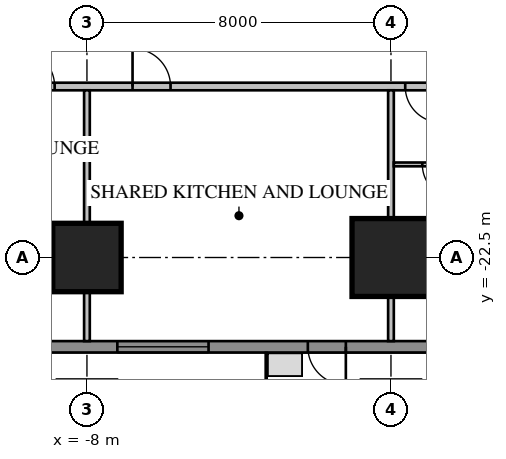
"""IFC4 building model, lengths in metres.
Left out: names, types, materials, properties, quantities, classifications, styles, units other than length and angle.
Written with IfcOpenShell. Run it as: python <this file> out.ifc"""

import sys

from ifc_helpers import new_model, si_unit, direction, frame, frame_2d, origin, origin_2d, place, context, subcontext, project, spatial, rectangle, extrude, element, fill, save


model = new_model("IFC4")
c1 = context("Model", 3, precision=1e-05, world=origin(), true_north=direction((0.0, 1.0)))
c2 = subcontext(c1, "Body", "Model", "MODEL_VIEW")
j1 = project(units=[si_unit("LENGTHUNIT", "METRE"), si_unit("PLANEANGLEUNIT", "RADIAN")], contexts=[c1])
p1 = place(None, origin())
s1 = spatial("IfcSite", under=j1, at=p1, CompositionType="ELEMENT")
p2 = place(p1, origin())
s2 = spatial("IfcBuilding", under=s1, at=p2, CompositionType="ELEMENT")
p3 = place(p2, frame((0.0, 0.0, 35.25)))
s3 = spatial("IfcBuildingStorey", under=s2, at=p3, CompositionType="ELEMENT", Elevation=35.25)
p4 = place(p3, frame((-8.0, -22.5, 0.0), z_axis=(0.0, 0.0, 1.0), x_axis=(1.0, 0.0, 0.0)))
e1 = element("IfcColumn", 1, at=p4, inside=s3, PredefinedType="COLUMN", context=c2, shape_type="SweptSolid", body=[
    extrude(rectangle(XDim=1.8, YDim=1.8, at=origin_2d()), origin(), (0.0, 0.0, 1.0), 3.85),
])
p5 = place(p3, frame((0.0, -22.5, 0.0), z_axis=(0.0, 0.0, 1.0), x_axis=(1.0, 0.0, 0.0)))
e2 = element("IfcColumn", 2, at=p5, inside=s3, PredefinedType="COLUMN", context=c2, shape_type="SweptSolid", body=[
    extrude(rectangle(XDim=2.05, YDim=2.05, at=origin_2d()), origin(), (0.0, 0.0, 1.0), 3.85),
])
p6 = place(p3, frame((-16.0, -24.85, 0.0), z_axis=(0.0, 0.0, 1.0), x_axis=(1.0, 0.0, 0.0)))
e3 = element("IfcWall", 3, at=p6, inside=s3, PredefinedType="SOLIDWALL", context=c2, shape_type="SweptSolid", body=[
    extrude(rectangle(XDim=32.0, YDim=0.3, at=frame_2d((16.0, 0.0))), origin(), (0.0, 0.0, 1.0), 3.65),
])
p7 = place(p6, frame((1.2, 0.0, 0.75)))
e4 = element("IfcOpeningElement", 4, at=p7, cuts=e3, PredefinedType="OPENING", context=c2, shape_type="SweptSolid", body=[
    extrude(rectangle(XDim=1.6, YDim=1.8, at=frame_2d((0.8, 0.9))), frame((0.0, 0.17, 0.0), z_axis=(0.0, -1.0, 0.0), x_axis=(1.0, 0.0, 0.0)), (0.0, 0.0, 1.0), 0.34),
])
p8 = place(p6, frame((5.2, 0.0, 0.75)))
e5 = element("IfcOpeningElement", 5, at=p8, cuts=e3, PredefinedType="OPENING", context=c2, shape_type="SweptSolid", body=[
    extrude(rectangle(XDim=1.6, YDim=1.8, at=frame_2d((0.8, 0.9))), frame((0.0, 0.17, 0.0), z_axis=(0.0, -1.0, 0.0), x_axis=(1.0, 0.0, 0.0)), (0.0, 0.0, 1.0), 0.34),
])
p9 = place(p6, frame((17.2, 0.0, 0.75)))
e6 = element("IfcOpeningElement", 6, at=p9, cuts=e3, PredefinedType="OPENING", context=c2, shape_type="SweptSolid", body=[
    extrude(rectangle(XDim=1.6, YDim=1.8, at=frame_2d((0.8, 0.9))), frame((0.0, 0.17, 0.0), z_axis=(0.0, -1.0, 0.0), x_axis=(1.0, 0.0, 0.0)), (0.0, 0.0, 1.0), 0.34),
])
p10 = place(p6, frame((21.2, 0.0, 0.75)))
e7 = element("IfcOpeningElement", 7, at=p10, cuts=e3, PredefinedType="OPENING", context=c2, shape_type="SweptSolid", body=[
    extrude(rectangle(XDim=1.6, YDim=1.8, at=frame_2d((0.8, 0.9))), frame((0.0, 0.17, 0.0), z_axis=(0.0, -1.0, 0.0), x_axis=(1.0, 0.0, 0.0)), (0.0, 0.0, 1.0), 0.34),
])
p11 = place(p6, frame((25.2, 0.0, 0.75)))
e8 = element("IfcOpeningElement", 8, at=p11, cuts=e3, PredefinedType="OPENING", context=c2, shape_type="SweptSolid", body=[
    extrude(rectangle(XDim=1.6, YDim=1.8, at=frame_2d((0.8, 0.9))), frame((0.0, 0.17, 0.0), z_axis=(0.0, -1.0, 0.0), x_axis=(1.0, 0.0, 0.0)), (0.0, 0.0, 1.0), 0.34),
])
p12 = place(p6, frame((29.2, 0.0, 0.75)))
e9 = element("IfcOpeningElement", 9, at=p12, cuts=e3, PredefinedType="OPENING", context=c2, shape_type="SweptSolid", body=[
    extrude(rectangle(XDim=1.6, YDim=1.8, at=frame_2d((0.8, 0.9))), frame((0.0, 0.17, 0.0), z_axis=(0.0, -1.0, 0.0), x_axis=(1.0, 0.0, 0.0)), (0.0, 0.0, 1.0), 0.34),
])
p13 = place(p6, frame((8.8, 0.0, 0.75)))
e10 = element("IfcOpeningElement", 10, at=p13, cuts=e3, PredefinedType="OPENING", context=c2, shape_type="SweptSolid", body=[
    extrude(rectangle(XDim=2.4, YDim=1.8, at=frame_2d((1.2, 0.9))), frame((0.0, 0.17, 0.0), z_axis=(0.0, -1.0, 0.0), x_axis=(1.0, 0.0, 0.0)), (0.0, 0.0, 1.0), 0.34),
])
p14 = place(p6, frame((13.812, 0.0, 0.0)))
e11 = element("IfcOpeningElement", 11, at=p14, cuts=e3, PredefinedType="OPENING", context=c2, shape_type="SweptSolid", body=[
    extrude(rectangle(XDim=1.0, YDim=2.4, at=frame_2d((0.5, 1.2))), frame((0.0, 0.17, 0.0), z_axis=(0.0, -1.0, 0.0), x_axis=(1.0, 0.0, 0.0)), (0.0, 0.0, 1.0), 0.34),
])
p15 = place(p3, frame((-18.0, -18.0, 0.0), z_axis=(0.0, 0.0, 1.0), x_axis=(1.0, 0.0, 0.0)))
e12 = element("IfcWall", 12, at=p15, inside=s3, PredefinedType="PARTITIONING", context=c2, shape_type="SweptSolid", body=[
    extrude(rectangle(XDim=36.0, YDim=0.2, at=frame_2d((18.0, 0.0))), origin(), (0.0, 0.0, 1.0), 3.65),
])
p16 = place(p15, frame((0.375, 0.0, 0.0)))
e13 = element("IfcOpeningElement", 13, at=p16, cuts=e12, PredefinedType="OPENING", context=c2, shape_type="SweptSolid", body=[
    extrude(rectangle(XDim=1.0, YDim=2.1, at=frame_2d((0.5, 1.05))), frame((0.0, 0.12, 0.0), z_axis=(0.0, -1.0, 0.0), x_axis=(1.0, 0.0, 0.0)), (0.0, 0.0, 1.0), 0.24),
])
p17 = place(p15, frame((2.45, 0.0, 0.0)))
e14 = element("IfcOpeningElement", 14, at=p17, cuts=e12, PredefinedType="OPENING", context=c2, shape_type="SweptSolid", body=[
    extrude(rectangle(XDim=0.8, YDim=2.1, at=frame_2d((0.4, 1.05))), frame((0.0, 0.12, 0.0), z_axis=(0.0, -1.0, 0.0), x_axis=(1.0, 0.0, 0.0)), (0.0, 0.0, 1.0), 0.24),
])
p18 = place(p15, frame((4.05, 0.0, 0.0)))
e15 = element("IfcOpeningElement", 15, at=p18, cuts=e12, PredefinedType="OPENING", context=c2, shape_type="SweptSolid", body=[
    extrude(rectangle(XDim=1.0, YDim=2.1, at=frame_2d((0.5, 1.05))), frame((0.0, 0.12, 0.0), z_axis=(0.0, -1.0, 0.0), x_axis=(1.0, 0.0, 0.0)), (0.0, 0.0, 1.0), 0.24),
])
p19 = place(p15, frame((6.45, 0.0, 0.0)))
e16 = element("IfcOpeningElement", 16, at=p19, cuts=e12, PredefinedType="OPENING", context=c2, shape_type="SweptSolid", body=[
    extrude(rectangle(XDim=0.9, YDim=2.1, at=frame_2d((0.45, 1.05))), frame((0.0, 0.12, 0.0), z_axis=(0.0, -1.0, 0.0), x_axis=(1.0, 0.0, 0.0)), (0.0, 0.0, 1.0), 0.24),
])
p20 = place(p15, frame((8.15, 0.0, 0.0)))
e17 = element("IfcOpeningElement", 17, at=p20, cuts=e12, PredefinedType="OPENING", context=c2, shape_type="SweptSolid", body=[
    extrude(rectangle(XDim=1.0, YDim=2.1, at=frame_2d((0.5, 1.05))), frame((0.0, 0.12, 0.0), z_axis=(0.0, -1.0, 0.0), x_axis=(1.0, 0.0, 0.0)), (0.0, 0.0, 1.0), 0.24),
])
p21 = place(p15, frame((18.375, 0.0, 0.0)))
e18 = element("IfcOpeningElement", 18, at=p21, cuts=e12, PredefinedType="OPENING", context=c2, shape_type="SweptSolid", body=[
    extrude(rectangle(XDim=0.95, YDim=2.1, at=frame_2d((0.475, 1.05))), frame((0.0, 0.12, 0.0), z_axis=(0.0, -1.0, 0.0), x_axis=(1.0, 0.0, 0.0)), (0.0, 0.0, 1.0), 0.24),
])
p22 = place(p15, frame((24.25, 0.0, 0.0)))
e19 = element("IfcOpeningElement", 19, at=p22, cuts=e12, PredefinedType="OPENING", context=c2, shape_type="SweptSolid", body=[
    extrude(rectangle(XDim=0.95, YDim=2.1, at=frame_2d((0.475, 1.05))), frame((0.0, 0.12, 0.0), z_axis=(0.0, -1.0, 0.0), x_axis=(1.0, 0.0, 0.0)), (0.0, 0.0, 1.0), 0.24),
])
p23 = place(p15, frame((26.375, 0.0, 0.0)))
e20 = element("IfcOpeningElement", 20, at=p23, cuts=e12, PredefinedType="OPENING", context=c2, shape_type="SweptSolid", body=[
    extrude(rectangle(XDim=0.95, YDim=2.1, at=frame_2d((0.475, 1.05))), frame((0.0, 0.12, 0.0), z_axis=(0.0, -1.0, 0.0), x_axis=(1.0, 0.0, 0.0)), (0.0, 0.0, 1.0), 0.24),
])
p24 = place(p15, frame((32.25, 0.0, 0.0)))
e21 = element("IfcOpeningElement", 21, at=p24, cuts=e12, PredefinedType="OPENING", context=c2, shape_type="SweptSolid", body=[
    extrude(rectangle(XDim=0.95, YDim=2.1, at=frame_2d((0.475, 1.05))), frame((0.0, 0.12, 0.0), z_axis=(0.0, -1.0, 0.0), x_axis=(1.0, 0.0, 0.0)), (0.0, 0.0, 1.0), 0.24),
])
p25 = place(p15, frame((34.375, 0.0, 0.0)))
e22 = element("IfcOpeningElement", 22, at=p25, cuts=e12, PredefinedType="OPENING", context=c2, shape_type="SweptSolid", body=[
    extrude(rectangle(XDim=0.95, YDim=2.1, at=frame_2d((0.475, 1.05))), frame((0.0, 0.12, 0.0), z_axis=(0.0, -1.0, 0.0), x_axis=(1.0, 0.0, 0.0)), (0.0, 0.0, 1.0), 0.24),
])
p26 = place(p15, frame((11.2, 0.0, 0.0)))
e23 = element("IfcOpeningElement", 23, at=p26, cuts=e12, PredefinedType="OPENING", context=c2, shape_type="SweptSolid", body=[
    extrude(rectangle(XDim=1.0, YDim=2.1, at=frame_2d((0.5, 1.05))), frame((0.0, 0.12, 0.0), z_axis=(0.0, -1.0, 0.0), x_axis=(1.0, 0.0, 0.0)), (0.0, 0.0, 1.0), 0.24),
])
p27 = place(p3, frame((-8.0, -18.1, 0.0), z_axis=(0.0, 0.0, 1.0), x_axis=(0.0, -1.0, 0.0)))
e24 = element("IfcWall", 24, at=p27, inside=s3, PredefinedType="PARTITIONING", context=c2, shape_type="SweptSolid", body=[
    extrude(rectangle(XDim=6.6, YDim=0.15, at=frame_2d((3.3, 0.0))), origin(), (0.0, 0.0, 1.0), 3.65),
])
p28 = place(p3, frame((0.0, -18.1, 0.0), z_axis=(0.0, 0.0, 1.0), x_axis=(0.0, -1.0, 0.0)))
e25 = element("IfcWall", 25, at=p28, inside=s3, PredefinedType="PARTITIONING", context=c2, shape_type="SweptSolid", body=[
    extrude(rectangle(XDim=6.6, YDim=0.15, at=frame_2d((3.3, 0.0))), origin(), (0.0, 0.0, 1.0), 2.809),
])
p29 = place(p3, frame((0.075, -20.05, 0.0), z_axis=(0.0, 0.0, 1.0), x_axis=(1.0, 0.0, 0.0)))
e26 = element("IfcWall", 26, at=p29, inside=s3, PredefinedType="PARTITIONING", context=c2, shape_type="SweptSolid", body=[
    extrude(rectangle(XDim=1.85, YDim=0.1, at=frame_2d((0.925, 0.0))), origin(), (0.0, 0.0, 1.0), 3.65),
])
p30 = place(p29, frame((0.75, 0.0, 0.0)))
e27 = element("IfcOpeningElement", 27, at=p30, cuts=e26, PredefinedType="OPENING", context=c2, shape_type="SweptSolid", body=[
    extrude(rectangle(XDim=0.9, YDim=2.1, at=frame_2d((0.45, 1.05))), frame((0.0, 0.07, 0.0), z_axis=(0.0, -1.0, 0.0), x_axis=(1.0, 0.0, 0.0)), (0.0, 0.0, 1.0), 0.14),
])
p31 = place(p13, origin())
e28 = element("IfcWindow", 28, at=p31, inside=s3, PartitioningType="SINGLE_PANEL", PredefinedType="WINDOW", context=c2, shape_type="SweptSolid", body=[
    extrude(rectangle(XDim=2.4, YDim=1.8, at=frame_2d((1.2, 0.9))), frame((0.0, 0.03, 0.0), z_axis=(0.0, -1.0, 0.0), x_axis=(1.0, 0.0, 0.0)), (0.0, 0.0, 1.0), 0.06),
])
fill(e10, e28)
p32 = place(p14, origin())
e29 = element("IfcDoor", 29, at=p32, inside=s3, OperationType="SINGLE_SWING_RIGHT", PredefinedType="DOOR", context=c2, shape_type="SweptSolid", body=[
    extrude(rectangle(XDim=1.0, YDim=2.4, at=frame_2d((0.5, 1.2))), frame((0.0, 0.025, 0.0), z_axis=(0.0, -1.0, 0.0), x_axis=(1.0, 0.0, 0.0)), (0.0, 0.0, 1.0), 0.05),
])
fill(e11, e29)
p33 = place(p20, origin())
e30 = element("IfcDoor", 30, at=p33, inside=s3, OperationType="SINGLE_SWING_LEFT", PredefinedType="DOOR", context=c2, shape_type="SweptSolid", body=[
    extrude(rectangle(XDim=1.0, YDim=2.1, at=frame_2d((0.5, 1.05))), frame((0.0, 0.025, 0.0), z_axis=(0.0, -1.0, 0.0), x_axis=(1.0, 0.0, 0.0)), (0.0, 0.0, 1.0), 0.05),
])
fill(e17, e30)
p34 = place(p21, origin())
e31 = element("IfcDoor", 31, at=p34, inside=s3, OperationType="SINGLE_SWING_RIGHT", PredefinedType="DOOR", context=c2, shape_type="SweptSolid", body=[
    extrude(rectangle(XDim=0.95, YDim=2.1, at=frame_2d((0.475, 1.05))), frame((0.0, 0.025, 0.0), z_axis=(0.0, -1.0, 0.0), x_axis=(1.0, 0.0, 0.0)), (0.0, 0.0, 1.0), 0.05),
])
fill(e18, e31)
p35 = place(p26, origin())
e32 = element("IfcDoor", 32, at=p35, inside=s3, OperationType="SINGLE_SWING_LEFT", PredefinedType="DOOR", context=c2, shape_type="SweptSolid", body=[
    extrude(rectangle(XDim=1.0, YDim=2.1, at=frame_2d((0.5, 1.05))), frame((0.0, 0.025, 0.0), z_axis=(0.0, -1.0, 0.0), x_axis=(1.0, 0.0, 0.0)), (0.0, 0.0, 1.0), 0.05),
])
fill(e23, e32)
p36 = place(p30, origin())
e33 = element("IfcDoor", 33, at=p36, inside=s3, OperationType="SINGLE_SWING_RIGHT", PredefinedType="DOOR", context=c2, shape_type="SweptSolid", body=[
    extrude(rectangle(XDim=0.9, YDim=2.1, at=frame_2d((0.45, 1.05))), frame((0.0, 0.025, 0.0), z_axis=(0.0, -1.0, 0.0), x_axis=(1.0, 0.0, 0.0)), (0.0, 0.0, 1.0), 0.05),
])
fill(e27, e33)
save(model, sys.argv[1])
